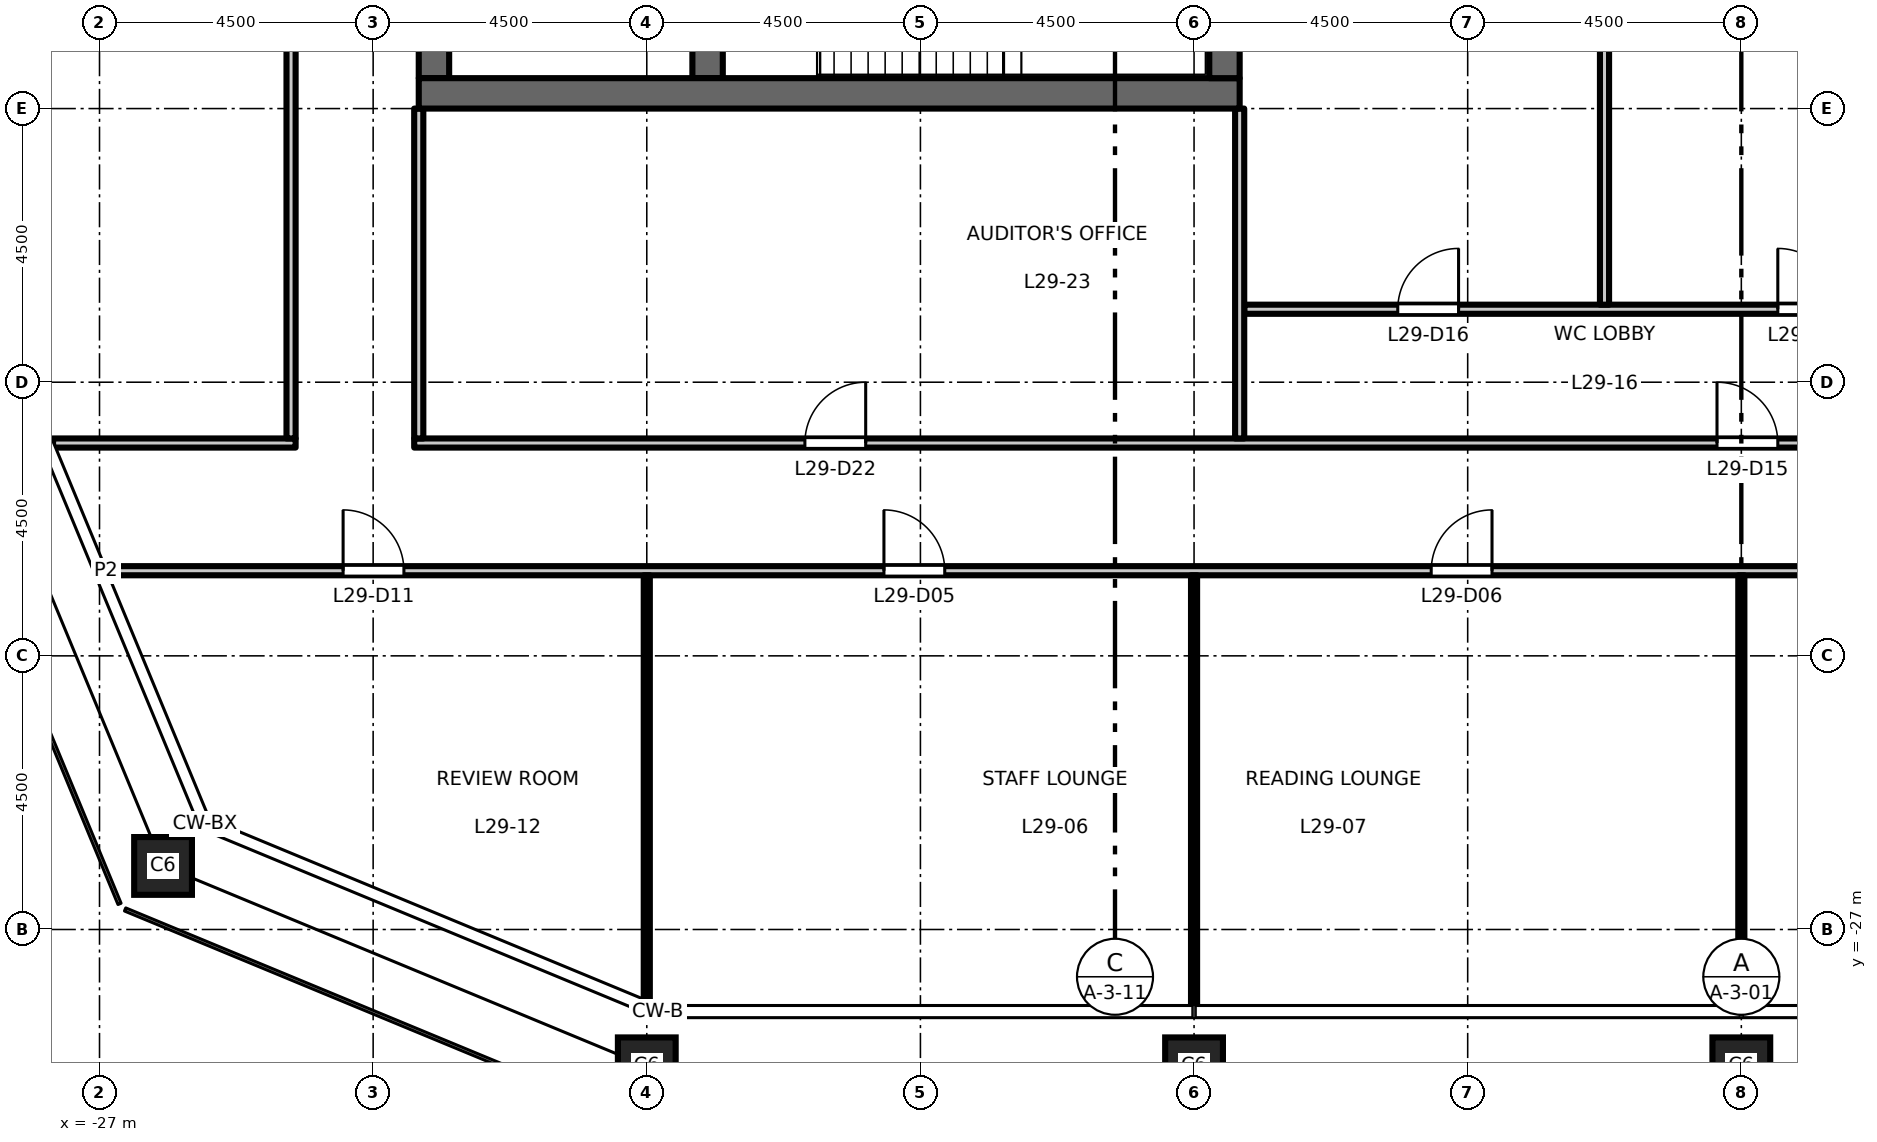
"""IFC4 building model, lengths in metres.
Left out: names, types, materials, properties, quantities, classifications, styles, units other than length and angle.
Written with IfcOpenShell. Run it as: python <this file> out.ifc"""

import sys

from ifc_helpers import new_model, si_unit, direction, frame, frame_2d, origin, origin_2d, place, context, subcontext, project, spatial, rectangle, hollow_rectangle, extrude, element, fill, save


model = new_model("IFC4")
c1 = context("Model", 3, precision=1e-05, world=origin(), true_north=direction((0.0, 1.0)))
c2 = subcontext(c1, "Body", "Model", "MODEL_VIEW")
j1 = project(units=[si_unit("LENGTHUNIT", "METRE"), si_unit("PLANEANGLEUNIT", "RADIAN")], contexts=[c1])
p1 = place(None, origin())
s1 = spatial("IfcSite", under=j1, at=p1, CompositionType="ELEMENT")
p2 = place(p1, origin())
s2 = spatial("IfcBuilding", under=s1, at=p2, CompositionType="ELEMENT")
p3 = place(p2, frame((0.0, 0.0, 136.2)))
s3 = spatial("IfcBuildingStorey", under=s2, at=p3, CompositionType="ELEMENT", Elevation=136.2)
for number, where, z_axis, x_axis in (
    (1, (-18.0, -29.25, 0.0), (0.0, 0.0, 1.0), (1.0, 0.0, 0.0)),
    (2, (-9.0, -29.25, 0.0), (0.0, 0.0, 1.0), (1.0, 0.0, 0.0)),
    (3, (0.0, -29.25, 0.0), (0.0, 0.0, 1.0), (1.0, 0.0, 0.0)),
    (4, (-25.955, -25.955, 0.0), (0.0, 0.0, 1.0), (1.0, 0.0, 0.0)),
):
    element("IfcColumn", number, at=place(p3, frame(where, z_axis=z_axis, x_axis=x_axis)), inside=s3, PredefinedType="COLUMN", context=c2, shape_type="SweptSolid", body=[
        extrude(hollow_rectangle(XDim=0.95, YDim=0.95, WallThickness=0.055, at=origin_2d()), origin(), (0.0, 0.0, 1.0), 4.5),
    ])
p4 = place(p3, frame((-21.5, -13.0, 0.0), z_axis=(0.0, 0.0, 1.0), x_axis=(0.0, 1.0, 0.0)))
e5 = element("IfcWall", 5, at=p4, inside=s3, PredefinedType="SHEAR", context=c2, shape_type="SweptSolid", body=[
    extrude(rectangle(XDim=26.0, YDim=0.5, at=frame_2d((13.0, 0.0))), origin(), (0.0, 0.0, 1.0), 4.35),
])
p5 = place(p4, frame((16.825, 0.0, 0.0)))
e6 = element("IfcOpeningElement", 6, at=p5, cuts=e5, PredefinedType="OPENING", context=c2, shape_type="SweptSolid", body=[
    extrude(rectangle(XDim=1.8, YDim=2.1, at=frame_2d((0.9, 1.05))), frame((0.0, 0.26, 0.0), z_axis=(0.0, -1.0, 0.0), x_axis=(1.0, 0.0, 0.0)), (0.0, 0.0, 1.0), 0.52),
])
p6 = place(p4, frame((7.375, 0.0, 0.0)))
e7 = element("IfcOpeningElement", 7, at=p6, cuts=e5, PredefinedType="OPENING", context=c2, shape_type="SweptSolid", body=[
    extrude(rectangle(XDim=1.8, YDim=2.1, at=frame_2d((0.9, 1.05))), frame((0.0, 0.26, 0.0), z_axis=(0.0, -1.0, 0.0), x_axis=(1.0, 0.0, 0.0)), (0.0, 0.0, 1.0), 0.52),
])
p7 = place(p4, frame((23.4, 0.0, 0.0)))
e8 = element("IfcOpeningElement", 8, at=p7, cuts=e5, PredefinedType="OPENING", context=c2, shape_type="SweptSolid", body=[
    extrude(rectangle(XDim=0.9, YDim=2.1, at=frame_2d((0.45, 1.05))), frame((0.0, 0.26, 0.0), z_axis=(0.0, -1.0, 0.0), x_axis=(1.0, 0.0, 0.0)), (0.0, 0.0, 1.0), 0.52),
])
p8 = place(p3, frame((-17.0, -13.0, 0.0), z_axis=(0.0, 0.0, 1.0), x_axis=(0.0, 1.0, 0.0)))
e9 = element("IfcWall", 9, at=p8, inside=s3, PredefinedType="SHEAR", context=c2, shape_type="SweptSolid", body=[
    extrude(rectangle(XDim=6.575, YDim=0.5, at=frame_2d((3.288, 0.0))), origin(), (0.0, 0.0, 1.0), 4.35),
])
p9 = place(p3, frame((-8.25, -13.25, 0.0), z_axis=(0.0, 0.0, 1.0), x_axis=(-1.0, 0.0, 0.0)))
e10 = element("IfcWall", 10, at=p9, inside=s3, PredefinedType="SHEAR", context=c2, shape_type="SweptSolid", body=[
    extrude(rectangle(XDim=13.5, YDim=0.5, at=frame_2d((6.75, 0.0))), origin(), (0.0, 0.0, 1.0), 4.35),
])
p10 = place(p3, frame((-8.5, -13.0, 0.0), z_axis=(0.0, 0.0, 1.0), x_axis=(0.0, 1.0, 0.0)))
e11 = element("IfcWall", 11, at=p10, inside=s3, PredefinedType="SHEAR", context=c2, shape_type="SweptSolid", body=[
    extrude(rectangle(XDim=26.0, YDim=0.5, at=frame_2d((13.0, 0.0))), origin(), (0.0, 0.0, 1.0), 4.35),
])
p11 = place(p3, frame((-26.894, -21.1, 0.0), z_axis=(0.0, 0.0, 1.0), x_axis=(1.0, 0.0, 0.0)))
e12 = element("IfcWall", 12, at=p11, inside=s3, PredefinedType="PARTITIONING", context=c2, shape_type="SweptSolid", body=[
    extrude(rectangle(XDim=53.788, YDim=0.15, at=frame_2d((26.894, 0.0))), origin(), (0.0, 0.0, 1.0), 4.35),
])
p12 = place(p11, frame((12.794, 0.0, 0.0)))
e13 = element("IfcOpeningElement", 13, at=p12, cuts=e12, PredefinedType="OPENING", context=c2, shape_type="SweptSolid", body=[
    extrude(rectangle(XDim=1.0, YDim=2.1, at=frame_2d((0.5, 1.05))), frame((0.0, 0.085, 0.0), z_axis=(0.0, -1.0, 0.0), x_axis=(1.0, 0.0, 0.0)), (0.0, 0.0, 1.0), 0.17),
])
p13 = place(p11, frame((21.794, 0.0, 0.0)))
e14 = element("IfcOpeningElement", 14, at=p13, cuts=e12, PredefinedType="OPENING", context=c2, shape_type="SweptSolid", body=[
    extrude(rectangle(XDim=1.0, YDim=2.1, at=frame_2d((0.5, 1.05))), frame((0.0, 0.085, 0.0), z_axis=(0.0, -1.0, 0.0), x_axis=(1.0, 0.0, 0.0)), (0.0, 0.0, 1.0), 0.17),
])
p14 = place(p11, frame((30.794, 0.0, 0.0)))
e15 = element("IfcOpeningElement", 15, at=p14, cuts=e12, PredefinedType="OPENING", context=c2, shape_type="SweptSolid", body=[
    extrude(rectangle(XDim=1.0, YDim=2.1, at=frame_2d((0.5, 1.05))), frame((0.0, 0.085, 0.0), z_axis=(0.0, -1.0, 0.0), x_axis=(1.0, 0.0, 0.0)), (0.0, 0.0, 1.0), 0.17),
])
p15 = place(p11, frame((39.794, 0.0, 0.0)))
e16 = element("IfcOpeningElement", 16, at=p15, cuts=e12, PredefinedType="OPENING", context=c2, shape_type="SweptSolid", body=[
    extrude(rectangle(XDim=1.0, YDim=2.1, at=frame_2d((0.5, 1.05))), frame((0.0, 0.085, 0.0), z_axis=(0.0, -1.0, 0.0), x_axis=(1.0, 0.0, 0.0)), (0.0, 0.0, 1.0), 0.17),
])
p16 = place(p11, frame((3.9, 0.0, 0.0)))
e17 = element("IfcOpeningElement", 17, at=p16, cuts=e12, PredefinedType="OPENING", context=c2, shape_type="SweptSolid", body=[
    extrude(rectangle(XDim=1.0, YDim=2.1, at=frame_2d((0.5, 1.05))), frame((0.0, 0.085, 0.0), z_axis=(0.0, -1.0, 0.0), x_axis=(1.0, 0.0, 0.0)), (0.0, 0.0, 1.0), 0.17),
])
p17 = place(p11, frame((48.794, 0.0, 0.0)))
e18 = element("IfcOpeningElement", 18, at=p17, cuts=e12, PredefinedType="OPENING", context=c2, shape_type="SweptSolid", body=[
    extrude(rectangle(XDim=1.0, YDim=2.1, at=frame_2d((0.5, 1.05))), frame((0.0, 0.085, 0.0), z_axis=(0.0, -1.0, 0.0), x_axis=(1.0, 0.0, 0.0)), (0.0, 0.0, 1.0), 0.17),
])
p18 = place(p3, frame((-27.764, -19.0, 0.0), z_axis=(0.0, 0.0, 1.0), x_axis=(1.0, 0.0, 0.0)))
e19 = element("IfcWall", 19, at=p18, inside=s3, PredefinedType="PARTITIONING", context=c2, shape_type="SweptSolid", body=[
    extrude(rectangle(XDim=3.989, YDim=0.15, at=frame_2d((1.995, 0.0))), origin(), (0.0, 0.0, 1.0), 4.35),
])
p19 = place(p3, frame((-21.825, -19.0, 0.0), z_axis=(0.0, 0.0, 1.0), x_axis=(1.0, 0.0, 0.0)))
e20 = element("IfcWall", 20, at=p19, inside=s3, PredefinedType="PARTITIONING", context=c2, shape_type="SweptSolid", body=[
    extrude(rectangle(XDim=43.65, YDim=0.15, at=frame_2d((21.825, 0.0))), origin(), (0.0, 0.0, 1.0), 4.35),
])
p20 = place(p19, frame((21.425, 0.0, 0.0)))
e21 = element("IfcOpeningElement", 21, at=p20, cuts=e20, PredefinedType="OPENING", context=c2, shape_type="SweptSolid", body=[
    extrude(rectangle(XDim=1.0, YDim=2.1, at=frame_2d((0.5, 1.05))), frame((0.0, 0.085, 0.0), z_axis=(0.0, -1.0, 0.0), x_axis=(1.0, 0.0, 0.0)), (0.0, 0.0, 1.0), 0.17),
])
p21 = place(p19, frame((6.425, 0.0, 0.0)))
e22 = element("IfcOpeningElement", 22, at=p21, cuts=e20, PredefinedType="OPENING", context=c2, shape_type="SweptSolid", body=[
    extrude(rectangle(XDim=1.0, YDim=2.1, at=frame_2d((0.5, 1.05))), frame((0.0, 0.085, 0.0), z_axis=(0.0, -1.0, 0.0), x_axis=(1.0, 0.0, 0.0)), (0.0, 0.0, 1.0), 0.17),
])
p22 = place(p19, frame((36.425, 0.0, 0.0)))
e23 = element("IfcOpeningElement", 23, at=p22, cuts=e20, PredefinedType="OPENING", context=c2, shape_type="SweptSolid", body=[
    extrude(rectangle(XDim=1.0, YDim=2.1, at=frame_2d((0.5, 1.05))), frame((0.0, 0.085, 0.0), z_axis=(0.0, -1.0, 0.0), x_axis=(1.0, 0.0, 0.0)), (0.0, 0.0, 1.0), 0.17),
])
p23 = place(p3, frame((-8.175, -16.8, 0.0), z_axis=(0.0, 0.0, 1.0), x_axis=(1.0, 0.0, 0.0)))
e24 = element("IfcWall", 24, at=p23, inside=s3, PredefinedType="PARTITIONING", context=c2, shape_type="SweptSolid", body=[
    extrude(rectangle(XDim=14.835, YDim=0.15, at=frame_2d((7.417, 0.0))), origin(), (0.0, 0.0, 1.0), 4.35),
])
p24 = place(p23, frame((2.525, 0.0, 0.0)))
e25 = element("IfcOpeningElement", 25, at=p24, cuts=e24, PredefinedType="OPENING", context=c2, shape_type="SweptSolid", body=[
    extrude(rectangle(XDim=1.0, YDim=2.1, at=frame_2d((0.5, 1.05))), frame((0.0, 0.085, 0.0), z_axis=(0.0, -1.0, 0.0), x_axis=(1.0, 0.0, 0.0)), (0.0, 0.0, 1.0), 0.17),
])
p25 = place(p23, frame((8.775, 0.0, 0.0)))
e26 = element("IfcOpeningElement", 26, at=p25, cuts=e24, PredefinedType="OPENING", context=c2, shape_type="SweptSolid", body=[
    extrude(rectangle(XDim=1.0, YDim=2.1, at=frame_2d((0.5, 1.05))), frame((0.0, 0.085, 0.0), z_axis=(0.0, -1.0, 0.0), x_axis=(1.0, 0.0, 0.0)), (0.0, 0.0, 1.0), 0.17),
])
p26 = place(p23, frame((12.935, 0.0, 0.0)))
e27 = element("IfcOpeningElement", 27, at=p26, cuts=e24, PredefinedType="OPENING", context=c2, shape_type="SweptSolid", body=[
    extrude(rectangle(XDim=1.0, YDim=2.1, at=frame_2d((0.5, 1.05))), frame((0.0, 0.085, 0.0), z_axis=(0.0, -1.0, 0.0), x_axis=(1.0, 0.0, 0.0)), (0.0, 0.0, 1.0), 0.17),
])
p27 = place(p3, frame((-23.85, -18.925, 0.0), z_axis=(0.0, 0.0, 1.0), x_axis=(0.0, 1.0, 0.0)))
e28 = element("IfcWall", 28, at=p27, inside=s3, PredefinedType="PARTITIONING", context=c2, shape_type="SweptSolid", body=[
    extrude(rectangle(XDim=37.85, YDim=0.15, at=frame_2d((18.925, 0.0))), origin(), (0.0, 0.0, 1.0), 4.35),
])
p28 = place(p27, frame((18.525, 0.0, 0.0)))
e29 = element("IfcOpeningElement", 29, at=p28, cuts=e28, PredefinedType="OPENING", context=c2, shape_type="SweptSolid", body=[
    extrude(rectangle(XDim=1.0, YDim=2.1, at=frame_2d((0.5, 1.05))), frame((0.0, 0.085, 0.0), z_axis=(0.0, -1.0, 0.0), x_axis=(1.0, 0.0, 0.0)), (0.0, 0.0, 1.0), 0.17),
])
p29 = place(p3, frame((-21.75, -18.925, 0.0), z_axis=(0.0, 0.0, 1.0), x_axis=(0.0, 1.0, 0.0)))
e30 = element("IfcWall", 30, at=p29, inside=s3, PredefinedType="PARTITIONING", context=c2, shape_type="SweptSolid", body=[
    extrude(rectangle(XDim=5.425, YDim=0.15, at=frame_2d((2.712, 0.0))), origin(), (0.0, 0.0, 1.0), 4.35),
])
p30 = place(p3, frame((-18.0, -28.178, 0.0), z_axis=(0.0, 0.0, 1.0), x_axis=(0.0, 1.0, 0.0)))
e31 = element("IfcWall", 31, at=p30, inside=s3, PredefinedType="PARTITIONING", context=c2, shape_type="SweptSolid", body=[
    extrude(rectangle(XDim=7.003, YDim=0.1, at=frame_2d((3.501, 0.0))), origin(), (0.0, 0.0, 1.0), 3.45),
])
p31 = place(p3, frame((-9.0, -28.26, 0.0), z_axis=(0.0, 0.0, 1.0), x_axis=(0.0, 1.0, 0.0)))
e32 = element("IfcWall", 32, at=p31, inside=s3, PredefinedType="PARTITIONING", context=c2, shape_type="SweptSolid", body=[
    extrude(rectangle(XDim=7.085, YDim=0.1, at=frame_2d((3.542, 0.0))), origin(), (0.0, 0.0, 1.0), 3.45),
])
p32 = place(p3, frame((-8.25, -18.925, 0.0), z_axis=(0.0, 0.0, 1.0), x_axis=(0.0, 1.0, 0.0)))
e33 = element("IfcWall", 33, at=p32, inside=s3, PredefinedType="PARTITIONING", context=c2, shape_type="SweptSolid", body=[
    extrude(rectangle(XDim=5.425, YDim=0.15, at=frame_2d((2.712, 0.0))), origin(), (0.0, 0.0, 1.0), 4.35),
])
p33 = place(p3, frame((-2.25, -16.725, 0.0), z_axis=(0.0, 0.0, 1.0), x_axis=(0.0, 1.0, 0.0)))
e34 = element("IfcWall", 34, at=p33, inside=s3, PredefinedType="PARTITIONING", context=c2, shape_type="SweptSolid", body=[
    extrude(rectangle(XDim=8.355, YDim=0.15, at=frame_2d((4.177, 0.0))), origin(), (0.0, 0.0, 1.0), 4.35),
])
p34 = place(p3, frame((0.0, -28.26, 0.0), z_axis=(0.0, 0.0, 1.0), x_axis=(0.0, 1.0, 0.0)))
e35 = element("IfcWall", 35, at=p34, inside=s3, PredefinedType="PARTITIONING", context=c2, shape_type="SweptSolid", body=[
    extrude(rectangle(XDim=7.085, YDim=0.1, at=frame_2d((3.542, 0.0))), origin(), (0.0, 0.0, 1.0), 3.45),
])
p35 = place(p12, origin())
e36 = element("IfcDoor", 36, at=p35, inside=s3, OperationType="SINGLE_SWING_LEFT", PredefinedType="DOOR", context=c2, shape_type="SweptSolid", body=[
    extrude(rectangle(XDim=1.0, YDim=2.1, at=frame_2d((0.5, 1.05))), frame((0.0, 0.025, 0.0), z_axis=(0.0, -1.0, 0.0), x_axis=(1.0, 0.0, 0.0)), (0.0, 0.0, 1.0), 0.05),
])
fill(e13, e36)
p36 = place(p13, origin())
e37 = element("IfcDoor", 37, at=p36, inside=s3, OperationType="SINGLE_SWING_RIGHT", PredefinedType="DOOR", context=c2, shape_type="SweptSolid", body=[
    extrude(rectangle(XDim=1.0, YDim=2.1, at=frame_2d((0.5, 1.05))), frame((0.0, 0.025, 0.0), z_axis=(0.0, -1.0, 0.0), x_axis=(1.0, 0.0, 0.0)), (0.0, 0.0, 1.0), 0.05),
])
fill(e14, e37)
p37 = place(p16, origin())
e38 = element("IfcDoor", 38, at=p37, inside=s3, OperationType="SINGLE_SWING_LEFT", PredefinedType="DOOR", context=c2, shape_type="SweptSolid", body=[
    extrude(rectangle(XDim=1.0, YDim=2.1, at=frame_2d((0.5, 1.05))), frame((0.0, 0.025, 0.0), z_axis=(0.0, -1.0, 0.0), x_axis=(1.0, 0.0, 0.0)), (0.0, 0.0, 1.0), 0.05),
])
fill(e17, e38)
p38 = place(p20, origin())
e39 = element("IfcDoor", 39, at=p38, inside=s3, OperationType="SINGLE_SWING_LEFT", PredefinedType="DOOR", context=c2, shape_type="SweptSolid", body=[
    extrude(rectangle(XDim=1.0, YDim=2.1, at=frame_2d((0.5, 1.05))), frame((0.0, 0.025, 0.0), z_axis=(0.0, -1.0, 0.0), x_axis=(1.0, 0.0, 0.0)), (0.0, 0.0, 1.0), 0.05),
])
fill(e21, e39)
p39 = place(p24, origin())
e40 = element("IfcDoor", 40, at=p39, inside=s3, OperationType="SINGLE_SWING_RIGHT", PredefinedType="DOOR", context=c2, shape_type="SweptSolid", body=[
    extrude(rectangle(XDim=1.0, YDim=2.1, at=frame_2d((0.5, 1.05))), frame((0.0, 0.025, 0.0), z_axis=(0.0, -1.0, 0.0), x_axis=(1.0, 0.0, 0.0)), (0.0, 0.0, 1.0), 0.05),
])
fill(e25, e40)
p40 = place(p25, origin())
e41 = element("IfcDoor", 41, at=p40, inside=s3, OperationType="SINGLE_SWING_LEFT", PredefinedType="DOOR", context=c2, shape_type="SweptSolid", body=[
    extrude(rectangle(XDim=1.0, YDim=2.1, at=frame_2d((0.5, 1.05))), frame((0.0, 0.025, 0.0), z_axis=(0.0, -1.0, 0.0), x_axis=(1.0, 0.0, 0.0)), (0.0, 0.0, 1.0), 0.05),
])
fill(e26, e41)
p41 = place(p21, origin())
e42 = element("IfcDoor", 42, at=p41, inside=s3, OperationType="SINGLE_SWING_RIGHT", PredefinedType="DOOR", context=c2, shape_type="SweptSolid", body=[
    extrude(rectangle(XDim=1.0, YDim=2.1, at=frame_2d((0.5, 1.05))), frame((0.0, 0.025, 0.0), z_axis=(0.0, -1.0, 0.0), x_axis=(1.0, 0.0, 0.0)), (0.0, 0.0, 1.0), 0.05),
])
fill(e22, e42)
save(model, sys.argv[1])
